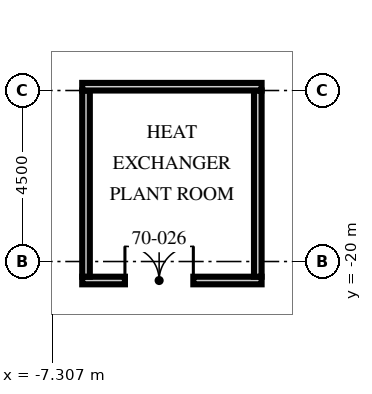
"""IFC4 building model, lengths in metres.
Left out: names, types, materials, properties, quantities, classifications, styles, units other than length and angle.
Written with IfcOpenShell. Run it as: python <this file> out.ifc"""

import sys

from ifc_helpers import new_model, si_unit, direction, frame, frame_2d, origin, origin_2d, place, context, subcontext, project, spatial, rectangle, extrude, element, fill, save


model = new_model("IFC4")
c1 = context("Model", 3, precision=1e-05, world=origin(), true_north=direction((0.0, 1.0)))
c2 = subcontext(c1, "Body", "Model", "MODEL_VIEW")
j1 = project(units=[si_unit("LENGTHUNIT", "METRE"), si_unit("PLANEANGLEUNIT", "RADIAN")], contexts=[c1])
p1 = place(None, origin())
s1 = spatial("IfcSite", under=j1, at=p1, CompositionType="ELEMENT")
p2 = place(p1, origin())
s2 = spatial("IfcBuilding", under=s1, at=p2, CompositionType="ELEMENT")
p3 = place(p2, frame((0.0, 0.0, 278.25)))
s3 = spatial("IfcBuildingStorey", under=s2, at=p3, CompositionType="ELEMENT", Elevation=278.25)
p4 = place(p3, frame((0.0, -24.4, -0.65), z_axis=(0.0, 0.334765406017, 0.942301503201), x_axis=(1.0, 0.0, 0.0)))
e1 = element("IfcColumn", 1, at=p4, inside=s3, PredefinedType="COLUMN", context=c2, shape_type="SweptSolid", body=[
    extrude(rectangle(XDim=2.8, YDim=1.8, at=origin_2d()), origin(), (0.0, 0.0, 1.0), 8.065),
])
p5 = place(p3, frame((-8.32, -24.4, -0.65), z_axis=(0.103601510687, 0.332963994967, 0.937230870724), x_axis=(0.994618884766, -0.034712905596, -0.097612951251)))
e2 = element("IfcColumn", 2, at=p5, inside=s3, PredefinedType="COLUMN", context=c2, shape_type="SweptSolid", body=[
    extrude(rectangle(XDim=2.8, YDim=1.8, at=origin_2d()), origin(), (0.0, 0.0, 1.0), 8.109),
])
p6 = place(p3, frame((-6.52, -20.5, 0.0), z_axis=(0.0, 0.0, 1.0), x_axis=(1.0, 0.0, 0.0)))
e3 = element("IfcWall", 3, at=p6, inside=s3, PredefinedType="SOLIDWALL", context=c2, shape_type="SweptSolid", body=[
    extrude(rectangle(XDim=4.72, YDim=0.2, at=frame_2d((2.36, 0.0))), origin(), (0.0, 0.0, 1.0), 6.56),
])
p7 = place(p6, frame((1.124, 0.0, 0.0)))
e4 = element("IfcOpeningElement", 4, at=p7, cuts=e3, PredefinedType="OPENING", context=c2, shape_type="SweptSolid", body=[
    extrude(rectangle(XDim=1.8, YDim=2.4, at=frame_2d((0.9, 1.2))), frame((0.0, 0.11, 0.0), z_axis=(0.0, -1.0, 0.0), x_axis=(1.0, 0.0, 0.0)), (0.0, 0.0, 1.0), 0.22),
])
for number, where, z_axis, x_axis in (
    (5, (-6.42, -20.4, 0.0), (0.0, 0.0, 1.0), (0.0, 1.0, 0.0)),
    (6, (-1.9, -20.4, 0.0), (0.0, 0.0, 1.0), (0.0, 1.0, 0.0)),
):
    element("IfcWall", number, at=place(p3, frame(where, z_axis=z_axis, x_axis=x_axis)), inside=s3, PredefinedType="SOLIDWALL", context=c2, shape_type="SweptSolid", body=[
        extrude(rectangle(XDim=4.9, YDim=0.2, at=frame_2d((2.45, 0.0))), origin(), (0.0, 0.0, 1.0), 7.25),
    ])
p8 = place(p3, frame((-6.52, -15.4, 0.0), z_axis=(0.0, 0.0, 1.0), x_axis=(1.0, 0.0, 0.0)))
e7 = element("IfcWall", 7, at=p8, inside=s3, PredefinedType="SOLIDWALL", context=c2, shape_type="SweptSolid", body=[
    extrude(rectangle(XDim=4.72, YDim=0.2, at=frame_2d((2.36, 0.0))), origin(), (0.0, 0.0, 1.0), 6.56),
])
p9 = place(p7, origin())
e8 = element("IfcDoor", 8, at=p9, inside=s3, OperationType="DOUBLE_DOOR_SINGLE_SWING", PredefinedType="DOOR", context=c2, shape_type="SweptSolid", body=[
    extrude(rectangle(XDim=1.8, YDim=2.4, at=frame_2d((0.9, 1.2))), frame((0.0, 0.025, 0.0), z_axis=(0.0, -1.0, 0.0), x_axis=(1.0, 0.0, 0.0)), (0.0, 0.0, 1.0), 0.05),
])
fill(e4, e8)
save(model, sys.argv[1])
